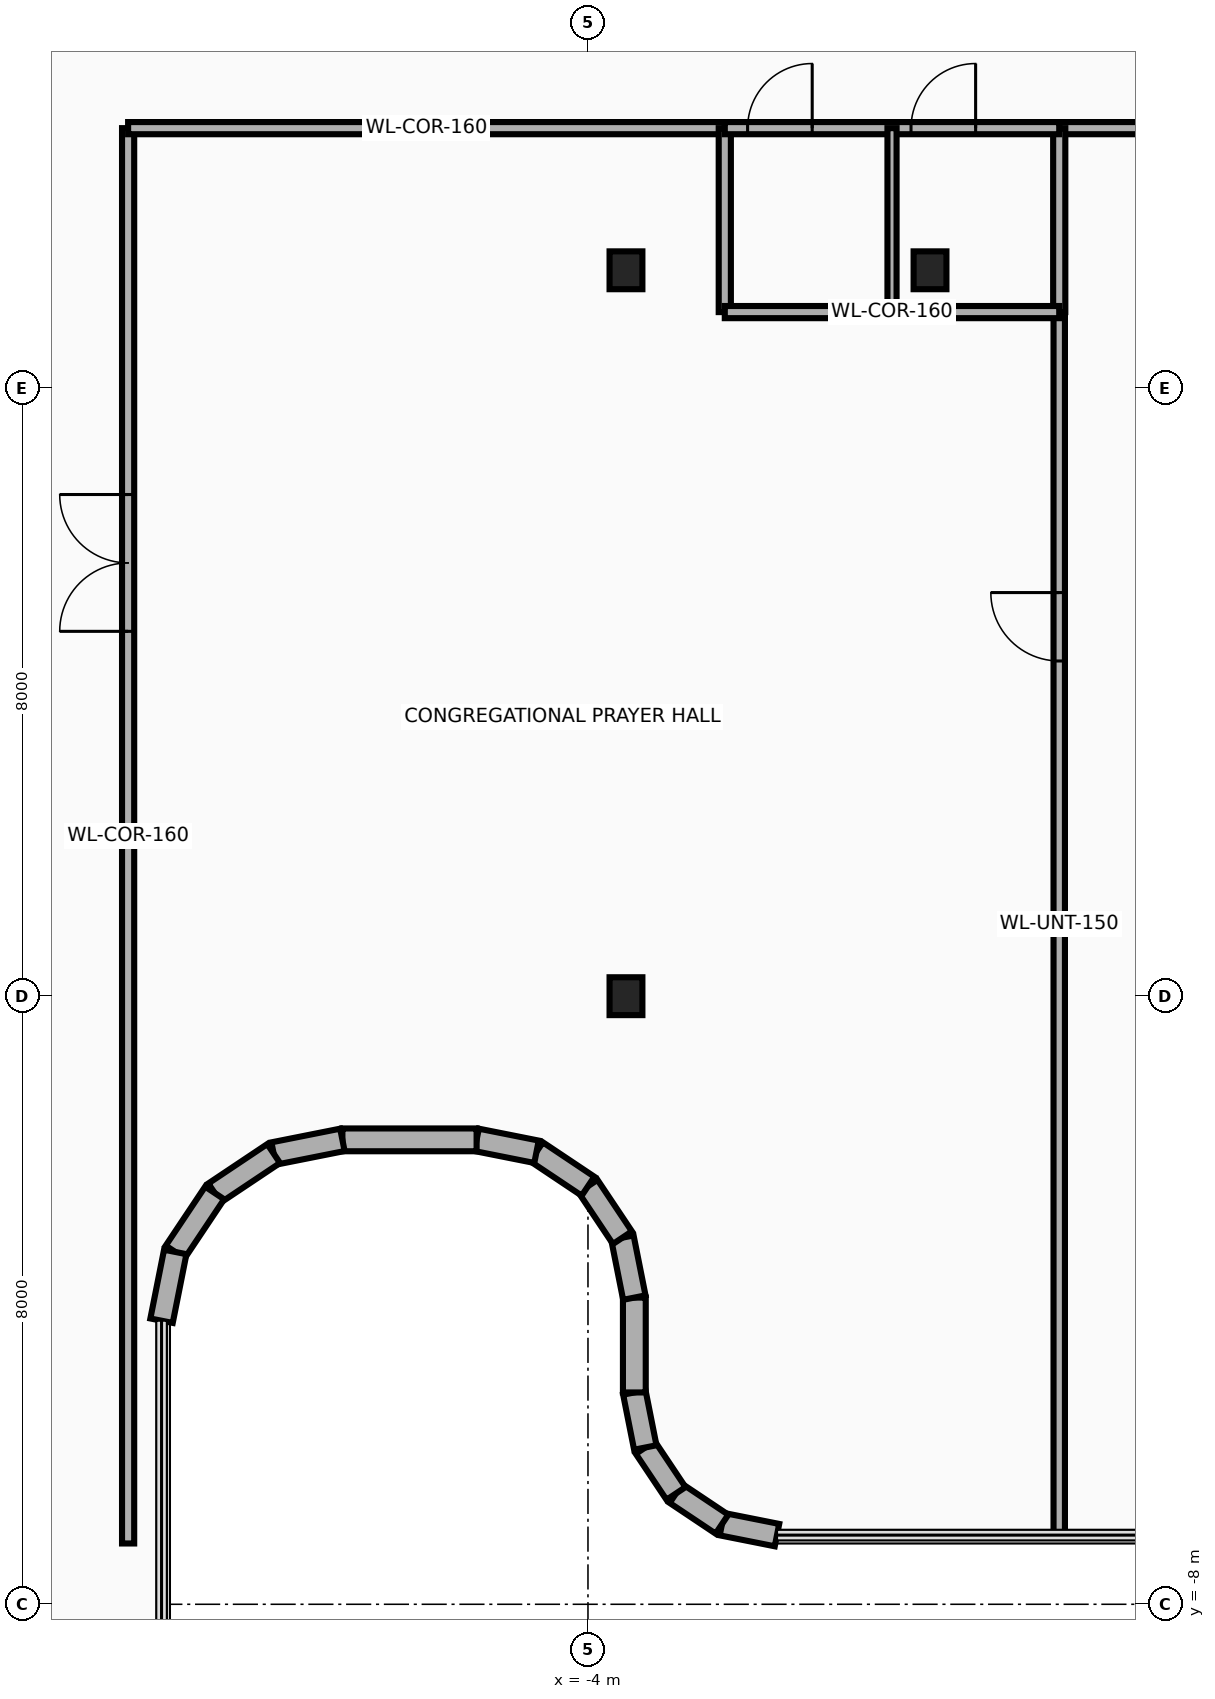
"""IFC4 building model, lengths in metres.
Left out: names, types, materials, properties, quantities, classifications, styles, units other than length and angle.
Written with IfcOpenShell. Run it as: python <this file> out.ifc"""

import sys

from ifc_helpers import new_model, si_unit, direction, frame, frame_2d, origin, origin_2d, place, context, subcontext, project, spatial, rectangle, i_section, extrude, source, transform, mapped, element, fill, save


model = new_model("IFC4")
c1 = context("Model", 3, precision=1e-05, world=origin(), true_north=direction((0.0, 1.0)))
c2 = subcontext(c1, "Body", "Model", "MODEL_VIEW")
j1 = project(units=[si_unit("LENGTHUNIT", "METRE"), si_unit("PLANEANGLEUNIT", "RADIAN")], contexts=[c1])
p1 = place(None, origin())
s1 = spatial("IfcSite", under=j1, at=p1, CompositionType="ELEMENT")
p2 = place(p1, origin())
s2 = spatial("IfcBuilding", under=s1, at=p2, CompositionType="ELEMENT")
p3 = place(p2, frame((0.0, 0.0, 184.45)))
s3 = spatial("IfcBuildingStorey", under=s2, at=p3, CompositionType="ELEMENT", Elevation=184.45)
m1 = source(origin(), c2, "Body", "SweptSolid", [
    extrude(i_section(OverallWidth=0.432, OverallDepth=0.498, WebThickness=0.056, FlangeThickness=0.089, at=origin_2d()), origin(), (0.0, 0.0, 1.0), 3.95),
])
for number, where, z_axis, x_axis in (
    (1, (-3.5, 0.0, 0.0), (0.0, 0.0, 1.0), (1.0, 0.0, 0.0)),
    (2, (-3.5, 9.55, 0.0), (0.0, 0.0, 1.0), (1.0, 0.0, 0.0)),
    (3, (0.5, 9.55, 0.0), (0.0, 0.0, 1.0), (1.0, 0.0, 0.0)),
):
    element("IfcColumn", number, at=place(p3, frame(where, z_axis=z_axis, x_axis=x_axis)), inside=s3, PredefinedType="COLUMN", context=c2, shape_type="MappedRepresentation", body=[
        mapped(m1, transform((0.0, 0.0, 0.0), x_axis=(1.0, 0.0, 0.0), y_axis=(0.0, 1.0, 0.0), z_axis=(0.0, 0.0, 1.0), scale=1.0)),
    ])
p4 = place(p3, frame((-1.513, -7.09, 0.0), z_axis=(0.0, 0.0, 1.0), x_axis=(-0.980783640462, 0.195098566376, 0.0)))
e4 = element("IfcWall", 4, at=p4, inside=s3, PredefinedType="SOLIDWALL", context=c2, shape_type="SweptSolid", body=[
    extrude(rectangle(XDim=0.738, YDim=0.3, at=frame_2d((0.369, 0.0))), origin(), (0.0, 0.0, 1.0), 3.076),
])
p5 = place(p3, frame((-2.237, -6.946, 0.0), z_axis=(0.0, 0.0, 1.0), x_axis=(-0.831378135196, 0.555707113792, 0.0)))
e5 = element("IfcWall", 5, at=p5, inside=s3, PredefinedType="SOLIDWALL", context=c2, shape_type="SweptSolid", body=[
    extrude(rectangle(XDim=0.727, YDim=0.3, at=frame_2d((0.364, 0.0))), origin(), (0.0, 0.0, 1.0), 3.63),
])
p6 = place(p3, frame((-2.842, -6.542, 0.0), z_axis=(0.0, 0.0, 1.0), x_axis=(-0.555784030735, 0.83132671747, 0.0)))
e6 = element("IfcWall", 6, at=p6, inside=s3, PredefinedType="SOLIDWALL", context=c2, shape_type="SweptSolid", body=[
    extrude(rectangle(XDim=0.728, YDim=0.3, at=frame_2d((0.364, 0.0))), origin(), (0.0, 0.0, 1.0), 2.615),
])
p7 = place(p3, frame((-3.246, -5.937, 0.0), z_axis=(0.0, 0.0, 1.0), x_axis=(-0.194780446724, 0.980846867546, 0.0)))
e7 = element("IfcWall", 7, at=p7, inside=s3, PredefinedType="SOLIDWALL", context=c2, shape_type="SweptSolid", body=[
    extrude(rectangle(XDim=0.738, YDim=0.3, at=frame_2d((0.369, 0.0))), origin(), (0.0, 0.0, 1.0), 2.615),
])
p8 = place(p3, frame((-3.39, -5.213, 0.0), z_axis=(0.0, 0.0, 1.0), x_axis=(0.0, 1.0, 0.0)))
e8 = element("IfcWall", 8, at=p8, inside=s3, PredefinedType="SOLIDWALL", context=c2, shape_type="SweptSolid", body=[
    extrude(rectangle(XDim=1.248, YDim=0.3, at=frame_2d((0.624, 0.0))), origin(), (0.0, 0.0, 1.0), 2.615),
])
p9 = place(p3, frame((-3.39, -3.965, 0.0), z_axis=(0.0, 0.0, 1.0), x_axis=(-0.195356525272, 0.980732291726, 0.0)))
e9 = element("IfcWall", 9, at=p9, inside=s3, PredefinedType="SOLIDWALL", context=c2, shape_type="SweptSolid", body=[
    extrude(rectangle(XDim=0.803, YDim=0.3, at=frame_2d((0.402, 0.0))), origin(), (0.0, 0.0, 1.0), 2.615),
])
for number, where, z_axis, x_axis in (
    (10, (-3.547, -3.177, 0.0), (0.0, 0.0, 1.0), (-0.556, 0.831, 0.0)),
    (11, (-4.0, -2.5, 0.0), (0.0, 0.0, 1.0), (-0.831, 0.556, 0.0)),
):
    element("IfcWall", number, at=place(p3, frame(where, z_axis=z_axis, x_axis=x_axis)), inside=s3, PredefinedType="SOLIDWALL", context=c2, shape_type="SweptSolid", body=[
        extrude(rectangle(XDim=0.815, YDim=0.3, at=frame_2d((0.407, 0.0))), origin(), (0.0, 0.0, 1.0), 2.615),
    ])
p10 = place(p3, frame((-4.677, -2.047, 0.0), z_axis=(0.0, 0.0, 1.0), x_axis=(-0.980732291726, 0.195356525272, 0.0)))
e12 = element("IfcWall", 12, at=p10, inside=s3, PredefinedType="SOLIDWALL", context=c2, shape_type="SweptSolid", body=[
    extrude(rectangle(XDim=0.803, YDim=0.3, at=frame_2d((0.402, 0.0))), origin(), (0.0, 0.0, 1.0), 3.63),
])
p11 = place(p3, frame((-5.465, -1.89, 0.0), z_axis=(0.0, 0.0, 1.0), x_axis=(-1.0, 0.0, 0.0)))
e13 = element("IfcWall", 13, at=p11, inside=s3, PredefinedType="SOLIDWALL", context=c2, shape_type="SweptSolid", body=[
    extrude(rectangle(XDim=1.766, YDim=0.3, at=frame_2d((0.883, 0.0))), origin(), (0.0, 0.0, 1.0), 3.63),
])
p12 = place(p3, frame((-7.231, -1.89, 0.0), z_axis=(0.0, 0.0, 1.0), x_axis=(-0.980743190895, -0.195301801101, 0.0)))
e14 = element("IfcWall", 14, at=p12, inside=s3, PredefinedType="SOLIDWALL", context=c2, shape_type="SweptSolid", body=[
    extrude(rectangle(XDim=0.923, YDim=0.3, at=frame_2d((0.461, 0.0))), origin(), (0.0, 0.0, 1.0), 2.415),
])
p13 = place(p3, frame((-8.135, -2.07, 0.0), z_axis=(0.0, 0.0, 1.0), x_axis=(-0.831607331814, -0.555364065883, 0.0)))
e15 = element("IfcWall", 15, at=p13, inside=s3, PredefinedType="SOLIDWALL", context=c2, shape_type="SweptSolid", body=[
    extrude(rectangle(XDim=0.933, YDim=0.3, at=frame_2d((0.467, 0.0))), origin(), (0.0, 0.0, 1.0), 2.415),
])
p14 = place(p3, frame((-8.912, -2.588, 0.0), z_axis=(0.0, 0.0, 1.0), x_axis=(-0.555364065883, -0.831607331814, 0.0)))
e16 = element("IfcWall", 16, at=p14, inside=s3, PredefinedType="SOLIDWALL", context=c2, shape_type="SweptSolid", body=[
    extrude(rectangle(XDim=0.933, YDim=0.3, at=frame_2d((0.467, 0.0))), origin(), (0.0, 0.0, 1.0), 3.63),
])
p15 = place(p3, frame((-9.43, -3.365, 0.0), z_axis=(0.0, 0.0, 1.0), x_axis=(-0.195301801101, -0.980743190895, 0.0)))
e17 = element("IfcWall", 17, at=p15, inside=s3, PredefinedType="SOLIDWALL", context=c2, shape_type="SweptSolid", body=[
    extrude(rectangle(XDim=0.923, YDim=0.3, at=frame_2d((0.461, 0.0))), origin(), (0.0, 0.0, 1.0), 3.63),
])
p16 = place(p3, frame((-10.05, -7.2, 0.0), z_axis=(0.0, 0.0, 1.0), x_axis=(0.0, 1.0, 0.0)))
e18 = element("IfcWall", 18, at=p16, inside=s3, PredefinedType="PARTITIONING", context=c2, shape_type="SweptSolid", body=[
    extrude(rectangle(XDim=18.62, YDim=0.16, at=frame_2d((9.31, 0.0))), origin(), (0.0, 0.0, 1.0), 2.415),
])
p17 = place(p16, frame((12.0, 0.0, 0.0)))
e19 = element("IfcOpeningElement", 19, at=p17, cuts=e18, PredefinedType="OPENING", context=c2, shape_type="SweptSolid", body=[
    extrude(rectangle(XDim=1.8, YDim=2.15, at=frame_2d((0.9, 1.075))), frame((0.0, 0.095, 0.0), z_axis=(0.0, -1.0, 0.0), x_axis=(1.0, 0.0, 0.0)), (0.0, 0.0, 1.0), 0.19),
])
p18 = place(p3, frame((-10.05, 11.42, 0.0), z_axis=(0.0, 0.0, 1.0), x_axis=(1.0, 0.0, 0.0)))
e20 = element("IfcWall", 20, at=p18, inside=s3, PredefinedType="PARTITIONING", context=c2, shape_type="SweptSolid", body=[
    extrude(rectangle(XDim=7.85, YDim=0.16, at=frame_2d((3.925, 0.0))), origin(), (0.0, 0.0, 1.0), 2.615),
])
p19 = place(p3, frame((2.2, 11.42, 0.0), z_axis=(0.0, 0.0, 1.0), x_axis=(1.0, 0.0, 0.0)))
e21 = element("IfcWall", 21, at=p19, inside=s3, PredefinedType="PARTITIONING", context=c2, shape_type="SweptSolid", body=[
    extrude(rectangle(XDim=11.22, YDim=0.16, at=frame_2d((5.61, 0.0))), origin(), (0.0, 0.0, 1.0), 2.615),
])
p20 = place(p19, frame((4.0, 0.0, 0.0)))
e22 = element("IfcOpeningElement", 22, at=p20, cuts=e21, PredefinedType="OPENING", context=c2, shape_type="SweptSolid", body=[
    extrude(rectangle(XDim=1.8, YDim=2.15, at=frame_2d((0.9, 1.075))), frame((0.0, 0.095, 0.0), z_axis=(0.0, -1.0, 0.0), x_axis=(1.0, 0.0, 0.0)), (0.0, 0.0, 1.0), 0.19),
])
p21 = place(p3, frame((2.2, -7.09, 0.0), z_axis=(0.0, 0.0, 1.0), x_axis=(0.0, 1.0, 0.0)))
e23 = element("IfcWall", 23, at=p21, inside=s3, PredefinedType="PARTITIONING", context=c2, shape_type="SweptSolid", body=[
    extrude(rectangle(XDim=16.09, YDim=0.15, at=frame_2d((8.045, 0.0))), origin(), (0.0, 0.0, 1.0), 2.665),
])
p22 = place(p21, frame((11.5, 0.0, 0.0)))
e24 = element("IfcOpeningElement", 24, at=p22, cuts=e23, PredefinedType="OPENING", context=c2, shape_type="SweptSolid", body=[
    extrude(rectangle(XDim=0.9, YDim=2.1, at=frame_2d((0.45, 1.05))), frame((0.0, 0.09, 0.0), z_axis=(0.0, -1.0, 0.0), x_axis=(1.0, 0.0, 0.0)), (0.0, 0.0, 1.0), 0.18),
])
for number, where, z_axis, x_axis in (
    (25, (-2.2, 9.0, 0.0), (0.0, 0.0, 1.0), (0.0, 1.0, 0.0)),
    (26, (2.2, 9.0, 0.0), (0.0, 0.0, 1.0), (0.0, 1.0, 0.0)),
):
    element("IfcWall", number, at=place(p3, frame(where, z_axis=z_axis, x_axis=x_axis)), inside=s3, PredefinedType="PARTITIONING", context=c2, shape_type="SweptSolid", body=[
        extrude(rectangle(XDim=2.42, YDim=0.16, at=frame_2d((1.21, 0.0))), origin(), (0.0, 0.0, 1.0), 2.665),
    ])
p23 = place(p3, frame((-2.2, 9.0, 0.0), z_axis=(0.0, 0.0, 1.0), x_axis=(1.0, 0.0, 0.0)))
e27 = element("IfcWall", 27, at=p23, inside=s3, PredefinedType="PARTITIONING", context=c2, shape_type="SweptSolid", body=[
    extrude(rectangle(XDim=4.4, YDim=0.16, at=frame_2d((2.2, 0.0))), origin(), (0.0, 0.0, 1.0), 3.63),
])
p24 = place(p3, frame((-2.2, 11.42, 0.0), z_axis=(0.0, 0.0, 1.0), x_axis=(1.0, 0.0, 0.0)))
e28 = element("IfcWall", 28, at=p24, inside=s3, PredefinedType="PARTITIONING", context=c2, shape_type="SweptSolid", body=[
    extrude(rectangle(XDim=4.4, YDim=0.16, at=frame_2d((2.2, 0.0))), origin(), (0.0, 0.0, 1.0), 3.63),
])
p25 = place(p24, frame((0.3, 0.0, 0.0)))
e29 = element("IfcOpeningElement", 29, at=p25, cuts=e28, PredefinedType="OPENING", context=c2, shape_type="SweptSolid", body=[
    extrude(rectangle(XDim=0.85, YDim=2.1, at=frame_2d((0.425, 1.05))), frame((0.0, 0.095, 0.0), z_axis=(0.0, -1.0, 0.0), x_axis=(1.0, 0.0, 0.0)), (0.0, 0.0, 1.0), 0.19),
])
p26 = place(p24, frame((2.45, 0.0, 0.0)))
e30 = element("IfcOpeningElement", 30, at=p26, cuts=e28, PredefinedType="OPENING", context=c2, shape_type="SweptSolid", body=[
    extrude(rectangle(XDim=0.85, YDim=2.1, at=frame_2d((0.425, 1.05))), frame((0.0, 0.095, 0.0), z_axis=(0.0, -1.0, 0.0), x_axis=(1.0, 0.0, 0.0)), (0.0, 0.0, 1.0), 0.19),
])
p27 = place(p3, frame((0.0, 9.0, 0.0), z_axis=(0.0, 0.0, 1.0), x_axis=(0.0, 1.0, 0.0)))
e31 = element("IfcWall", 31, at=p27, inside=s3, PredefinedType="PARTITIONING", context=c2, shape_type="SweptSolid", body=[
    extrude(rectangle(XDim=2.42, YDim=0.12, at=frame_2d((1.21, 0.0))), origin(), (0.0, 0.0, 1.0), 2.665),
])
p28 = place(p17, origin())
e32 = element("IfcDoor", 32, at=p28, inside=s3, OperationType="DOUBLE_DOOR_SINGLE_SWING", PredefinedType="DOOR", context=c2, shape_type="SweptSolid", body=[
    extrude(rectangle(XDim=1.8, YDim=2.15, at=frame_2d((0.9, 1.075))), frame((0.0, 0.025, 0.0), z_axis=(0.0, -1.0, 0.0), x_axis=(1.0, 0.0, 0.0)), (0.0, 0.0, 1.0), 0.05),
])
fill(e19, e32)
p29 = place(p22, origin())
e33 = element("IfcDoor", 33, at=p29, inside=s3, OperationType="SINGLE_SWING_RIGHT", PredefinedType="DOOR", context=c2, shape_type="SweptSolid", body=[
    extrude(rectangle(XDim=0.9, YDim=2.1, at=frame_2d((0.45, 1.05))), frame((0.0, 0.025, 0.0), z_axis=(0.0, -1.0, 0.0), x_axis=(1.0, 0.0, 0.0)), (0.0, 0.0, 1.0), 0.05),
])
fill(e24, e33)
p30 = place(p25, origin())
e34 = element("IfcDoor", 34, at=p30, inside=s3, OperationType="SINGLE_SWING_LEFT", PredefinedType="DOOR", context=c2, shape_type="SweptSolid", body=[
    extrude(rectangle(XDim=0.85, YDim=2.1, at=frame_2d((0.425, 1.05))), frame((0.0, 0.025, 0.0), z_axis=(0.0, -1.0, 0.0), x_axis=(1.0, 0.0, 0.0)), (0.0, 0.0, 1.0), 0.05),
])
fill(e29, e34)
p31 = place(p26, origin())
e35 = element("IfcDoor", 35, at=p31, inside=s3, OperationType="SINGLE_SWING_RIGHT", PredefinedType="DOOR", context=c2, shape_type="SweptSolid", body=[
    extrude(rectangle(XDim=0.85, YDim=2.1, at=frame_2d((0.425, 1.05))), frame((0.0, 0.025, 0.0), z_axis=(0.0, -1.0, 0.0), x_axis=(1.0, 0.0, 0.0)), (0.0, 0.0, 1.0), 0.05),
])
fill(e30, e35)
save(model, sys.argv[1])
